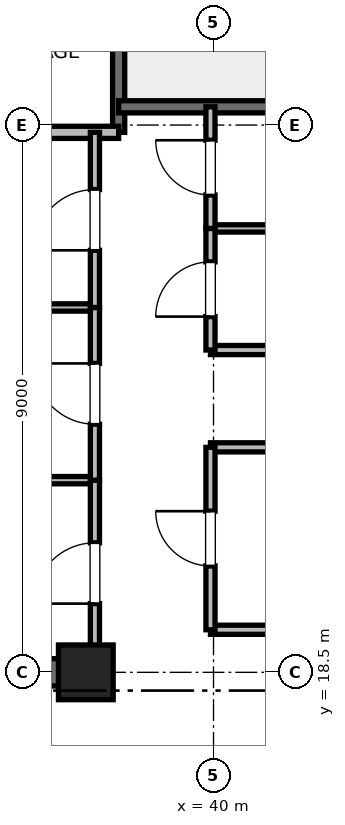
"""IFC4 building model, lengths in metres.
Left out: names, types, materials, properties, quantities, classifications, styles, units other than length and angle.
Written with IfcOpenShell. Run it as: python <this file> out.ifc"""

import sys

from ifc_helpers import new_model, si_unit, direction, frame, frame_2d, origin, origin_2d, place, context, subcontext, project, spatial, rectangle, extrude, element, fill, save


model = new_model("IFC4")
c1 = context("Model", 3, precision=1e-05, world=origin(), true_north=direction((0.0, 1.0)))
c2 = subcontext(c1, "Body", "Model", "MODEL_VIEW")
j1 = project(units=[si_unit("LENGTHUNIT", "METRE"), si_unit("PLANEANGLEUNIT", "RADIAN")], contexts=[c1])
p1 = place(None, origin())
s1 = spatial("IfcSite", under=j1, at=p1, CompositionType="ELEMENT")
p2 = place(p1, origin())
s2 = spatial("IfcBuilding", under=s1, at=p2, CompositionType="ELEMENT")
p3 = place(p2, frame((0.0, 0.0, 247.2)))
s3 = spatial("IfcBuildingStorey", under=s2, at=p3, CompositionType="ELEMENT", Elevation=247.2)
p4 = place(p3, frame((37.9, 18.5, 0.0), z_axis=(0.0, 0.0, 1.0), x_axis=(1.0, 0.0, 0.0)))
e1 = element("IfcColumn", 1, at=p4, inside=s3, PredefinedType="PILASTER", context=c2, shape_type="SweptSolid", body=[
    extrude(rectangle(XDim=0.9, YDim=0.9, at=origin_2d()), origin(), (0.0, 0.0, 1.0), 4.0),
])
p5 = place(p3, frame((29.0, 18.5, 0.0), z_axis=(0.0, 0.0, 1.0), x_axis=(1.0, 0.0, 0.0)))
e2 = element("IfcWall", 2, at=p5, inside=s3, PredefinedType="SHEAR", context=c2, shape_type="SweptSolid", body=[
    extrude(rectangle(XDim=9.2, YDim=0.45, at=frame_2d((4.6, 0.0))), origin(), (0.0, 0.0, 1.0), 3.785),
])
p6 = place(p3, frame((38.44, 27.38, 0.0), z_axis=(0.0, 0.0, 1.0), x_axis=(0.0, 1.0, 0.0)))
e3 = element("IfcWall", 3, at=p6, inside=s3, PredefinedType="SOLIDWALL", context=c2, shape_type="SweptSolid", body=[
    extrude(rectangle(XDim=8.87, YDim=0.2, at=frame_2d((4.435, 0.0))), origin(), (0.0, 0.0, 1.0), 3.785),
])
p7 = place(p3, frame((38.44, 27.8, 0.0), z_axis=(0.0, 0.0, 1.0), x_axis=(1.0, 0.0, 0.0)))
e4 = element("IfcWall", 4, at=p7, inside=s3, PredefinedType="SOLIDWALL", context=c2, shape_type="SweptSolid", body=[
    extrude(rectangle(XDim=3.32, YDim=0.2, at=frame_2d((1.66, 0.0))), origin(), (0.0, 0.0, 1.0), 3.785),
])
p8 = place(p3, frame((32.82, 27.38, 0.0), z_axis=(0.0, 0.0, 1.0), x_axis=(1.0, 0.0, 0.0)))
e5 = element("IfcWall", 5, at=p8, inside=s3, PredefinedType="PARTITIONING", context=c2, shape_type="SweptSolid", body=[
    extrude(rectangle(XDim=5.62, YDim=0.2, at=frame_2d((2.81, 0.0))), origin(), (0.0, 0.0, 1.0), 3.785),
])
for number, where, z_axis, x_axis in (
    (6, (39.95, 19.2, 0.0), (0.0, 0.0, 1.0), (1.0, 0.0, 0.0)),
    (7, (39.95, 22.2, 0.0), (0.0, 0.0, 1.0), (1.0, 0.0, 0.0)),
    (8, (39.95, 23.8, 0.0), (0.0, 0.0, 1.0), (1.0, 0.0, 0.0)),
):
    element("IfcWall", number, at=place(p3, frame(where, z_axis=z_axis, x_axis=x_axis)), inside=s3, PredefinedType="PARTITIONING", context=c2, shape_type="SweptSolid", body=[
        extrude(rectangle(XDim=1.81, YDim=0.15, at=frame_2d((0.905, 0.0))), origin(), (0.0, 0.0, 1.0), 2.85),
    ])
p9 = place(p3, frame((39.95, 25.8, 0.0), z_axis=(0.0, 0.0, 1.0), x_axis=(1.0, 0.0, 0.0)))
e9 = element("IfcWall", 9, at=p9, inside=s3, PredefinedType="PARTITIONING", context=c2, shape_type="SweptSolid", body=[
    extrude(rectangle(XDim=1.81, YDim=0.12, at=frame_2d((0.905, 0.0))), origin(), (0.0, 0.0, 1.0), 2.85),
])
p10 = place(p3, frame((39.95, 19.2, 0.0), z_axis=(0.0, 0.0, 1.0), x_axis=(0.0, 1.0, 0.0)))
e10 = element("IfcWall", 10, at=p10, inside=s3, PredefinedType="PARTITIONING", context=c2, shape_type="SweptSolid", body=[
    extrude(rectangle(XDim=3.0, YDim=0.15, at=frame_2d((1.5, 0.0))), origin(), (0.0, 0.0, 1.0), 2.85),
])
p11 = place(p10, frame((1.05, 0.0, 0.0)))
e11 = element("IfcOpeningElement", 11, at=p11, cuts=e10, PredefinedType="OPENING", context=c2, shape_type="SweptSolid", body=[
    extrude(rectangle(XDim=0.9, YDim=2.1, at=frame_2d((0.45, 1.05))), frame((0.0, 0.075, 0.0), z_axis=(0.0, -1.0, 0.0), x_axis=(1.0, 0.0, 0.0)), (0.0, 0.0, 1.0), 0.15),
])
p12 = place(p3, frame((39.95, 23.8, 0.0), z_axis=(0.0, 0.0, 1.0), x_axis=(0.0, 1.0, 0.0)))
e12 = element("IfcWall", 12, at=p12, inside=s3, PredefinedType="PARTITIONING", context=c2, shape_type="SweptSolid", body=[
    extrude(rectangle(XDim=2.0, YDim=0.15, at=frame_2d((1.0, 0.0))), origin(), (0.0, 0.0, 1.0), 2.85),
])
p13 = place(p12, frame((0.55, 0.0, 0.0)))
e13 = element("IfcOpeningElement", 13, at=p13, cuts=e12, PredefinedType="OPENING", context=c2, shape_type="SweptSolid", body=[
    extrude(rectangle(XDim=0.9, YDim=2.1, at=frame_2d((0.45, 1.05))), frame((0.0, 0.075, 0.0), z_axis=(0.0, -1.0, 0.0), x_axis=(1.0, 0.0, 0.0)), (0.0, 0.0, 1.0), 0.15),
])
p14 = place(p3, frame((39.95, 25.8, 0.0), z_axis=(0.0, 0.0, 1.0), x_axis=(0.0, 1.0, 0.0)))
e14 = element("IfcWall", 14, at=p14, inside=s3, PredefinedType="PARTITIONING", context=c2, shape_type="SweptSolid", body=[
    extrude(rectangle(XDim=2.0, YDim=0.15, at=frame_2d((1.0, 0.0))), origin(), (0.0, 0.0, 1.0), 2.85),
])
p15 = place(p14, frame((0.55, 0.0, 0.0)))
e15 = element("IfcOpeningElement", 15, at=p15, cuts=e14, PredefinedType="OPENING", context=c2, shape_type="SweptSolid", body=[
    extrude(rectangle(XDim=0.9, YDim=2.1, at=frame_2d((0.45, 1.05))), frame((0.0, 0.075, 0.0), z_axis=(0.0, -1.0, 0.0), x_axis=(1.0, 0.0, 0.0)), (0.0, 0.0, 1.0), 0.15),
])
for number, where, z_axis, x_axis in (
    (16, (32.82, 21.66, 0.0), (0.0, 0.0, 1.0), (1.0, 0.0, 0.0)),
    (17, (32.82, 24.5, 0.0), (0.0, 0.0, 1.0), (1.0, 0.0, 0.0)),
):
    element("IfcWall", number, at=place(p3, frame(where, z_axis=z_axis, x_axis=x_axis)), inside=s3, PredefinedType="PARTITIONING", context=c2, shape_type="SweptSolid", body=[
        extrude(rectangle(XDim=5.23, YDim=0.12, at=frame_2d((2.615, 0.0))), origin(), (0.0, 0.0, 1.0), 2.85),
    ])
p16 = place(p3, frame((38.05, 18.6, 0.0), z_axis=(0.0, 0.0, 1.0), x_axis=(0.0, 1.0, 0.0)))
e18 = element("IfcWall", 18, at=p16, inside=s3, PredefinedType="PARTITIONING", context=c2, shape_type="SweptSolid", body=[
    extrude(rectangle(XDim=3.06, YDim=0.15, at=frame_2d((1.53, 0.0))), origin(), (0.0, 0.0, 1.0), 2.85),
])
p17 = place(p16, frame((1.03, 0.0, 0.0)))
e19 = element("IfcOpeningElement", 19, at=p17, cuts=e18, PredefinedType="OPENING", context=c2, shape_type="SweptSolid", body=[
    extrude(rectangle(XDim=1.0, YDim=2.15, at=frame_2d((0.5, 1.075))), frame((0.0, 0.075, 0.0), z_axis=(0.0, -1.0, 0.0), x_axis=(1.0, 0.0, 0.0)), (0.0, 0.0, 1.0), 0.15),
])
p18 = place(p3, frame((38.05, 21.66, 0.0), z_axis=(0.0, 0.0, 1.0), x_axis=(0.0, 1.0, 0.0)))
e20 = element("IfcWall", 20, at=p18, inside=s3, PredefinedType="PARTITIONING", context=c2, shape_type="SweptSolid", body=[
    extrude(rectangle(XDim=2.84, YDim=0.15, at=frame_2d((1.42, 0.0))), origin(), (0.0, 0.0, 1.0), 2.85),
])
p19 = place(p18, frame((0.92, 0.0, 0.0)))
e21 = element("IfcOpeningElement", 21, at=p19, cuts=e20, PredefinedType="OPENING", context=c2, shape_type="SweptSolid", body=[
    extrude(rectangle(XDim=1.0, YDim=2.15, at=frame_2d((0.5, 1.075))), frame((0.0, 0.075, 0.0), z_axis=(0.0, -1.0, 0.0), x_axis=(1.0, 0.0, 0.0)), (0.0, 0.0, 1.0), 0.15),
])
p20 = place(p3, frame((38.05, 24.5, 0.0), z_axis=(0.0, 0.0, 1.0), x_axis=(0.0, 1.0, 0.0)))
e22 = element("IfcWall", 22, at=p20, inside=s3, PredefinedType="PARTITIONING", context=c2, shape_type="SweptSolid", body=[
    extrude(rectangle(XDim=2.88, YDim=0.15, at=frame_2d((1.44, 0.0))), origin(), (0.0, 0.0, 1.0), 2.85),
])
p21 = place(p20, frame((0.94, 0.0, 0.0)))
e23 = element("IfcOpeningElement", 23, at=p21, cuts=e22, PredefinedType="OPENING", context=c2, shape_type="SweptSolid", body=[
    extrude(rectangle(XDim=1.0, YDim=2.15, at=frame_2d((0.5, 1.075))), frame((0.0, 0.075, 0.0), z_axis=(0.0, -1.0, 0.0), x_axis=(1.0, 0.0, 0.0)), (0.0, 0.0, 1.0), 0.15),
])
p22 = place(p11, origin())
e24 = element("IfcDoor", 24, at=p22, inside=s3, OperationType="SINGLE_SWING_RIGHT", PredefinedType="DOOR", context=c2, shape_type="SweptSolid", body=[
    extrude(rectangle(XDim=0.9, YDim=2.1, at=frame_2d((0.45, 1.05))), frame((0.0, 0.025, 0.0), z_axis=(0.0, -1.0, 0.0), x_axis=(1.0, 0.0, 0.0)), (0.0, 0.0, 1.0), 0.05),
])
fill(e11, e24)
p23 = place(p13, origin())
e25 = element("IfcDoor", 25, at=p23, inside=s3, OperationType="SINGLE_SWING_LEFT", PredefinedType="DOOR", context=c2, shape_type="SweptSolid", body=[
    extrude(rectangle(XDim=0.9, YDim=2.1, at=frame_2d((0.45, 1.05))), frame((0.0, 0.025, 0.0), z_axis=(0.0, -1.0, 0.0), x_axis=(1.0, 0.0, 0.0)), (0.0, 0.0, 1.0), 0.05),
])
fill(e13, e25)
p24 = place(p15, origin())
e26 = element("IfcDoor", 26, at=p24, inside=s3, OperationType="SINGLE_SWING_RIGHT", PredefinedType="DOOR", context=c2, shape_type="SweptSolid", body=[
    extrude(rectangle(XDim=0.9, YDim=2.1, at=frame_2d((0.45, 1.05))), frame((0.0, 0.025, 0.0), z_axis=(0.0, -1.0, 0.0), x_axis=(1.0, 0.0, 0.0)), (0.0, 0.0, 1.0), 0.05),
])
fill(e15, e26)
p25 = place(p17, origin())
e27 = element("IfcDoor", 27, at=p25, inside=s3, OperationType="SINGLE_SWING_LEFT", PredefinedType="DOOR", context=c2, shape_type="SweptSolid", body=[
    extrude(rectangle(XDim=1.0, YDim=2.15, at=frame_2d((0.5, 1.075))), frame((0.0, 0.025, 0.0), z_axis=(0.0, -1.0, 0.0), x_axis=(1.0, 0.0, 0.0)), (0.0, 0.0, 1.0), 0.05),
])
fill(e19, e27)
p26 = place(p19, origin())
e28 = element("IfcDoor", 28, at=p26, inside=s3, OperationType="SINGLE_SWING_RIGHT", PredefinedType="DOOR", context=c2, shape_type="SweptSolid", body=[
    extrude(rectangle(XDim=1.0, YDim=2.15, at=frame_2d((0.5, 1.075))), frame((0.0, 0.025, 0.0), z_axis=(0.0, -1.0, 0.0), x_axis=(1.0, 0.0, 0.0)), (0.0, 0.0, 1.0), 0.05),
])
fill(e21, e28)
p27 = place(p21, origin())
e29 = element("IfcDoor", 29, at=p27, inside=s3, OperationType="SINGLE_SWING_LEFT", PredefinedType="DOOR", context=c2, shape_type="SweptSolid", body=[
    extrude(rectangle(XDim=1.0, YDim=2.15, at=frame_2d((0.5, 1.075))), frame((0.0, 0.025, 0.0), z_axis=(0.0, -1.0, 0.0), x_axis=(1.0, 0.0, 0.0)), (0.0, 0.0, 1.0), 0.05),
])
fill(e23, e29)
save(model, sys.argv[1])
